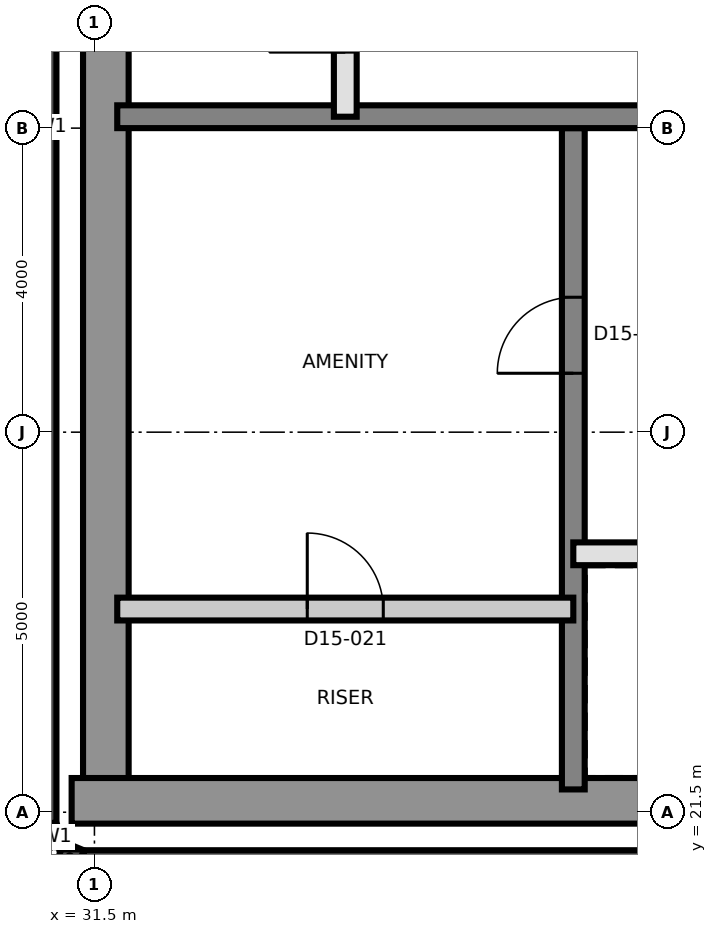
"""IFC4 building model, lengths in metres.
Left out: names, types, materials, properties, quantities, classifications, styles, units other than length and angle.
Written with IfcOpenShell. Run it as: python <this file> out.ifc"""

import sys

from ifc_helpers import new_model, si_unit, direction, frame, frame_2d, origin, place, context, subcontext, project, spatial, rectangle, extrude, element, fill, save


model = new_model("IFC4")
c1 = context("Model", 3, precision=1e-05, world=origin(), true_north=direction((0.0, 1.0)))
c2 = subcontext(c1, "Body", "Model", "MODEL_VIEW")
j1 = project(units=[si_unit("LENGTHUNIT", "METRE"), si_unit("PLANEANGLEUNIT", "RADIAN")], contexts=[c1])
p1 = place(None, origin())
s1 = spatial("IfcSite", under=j1, at=p1, CompositionType="ELEMENT")
p2 = place(p1, origin())
s2 = spatial("IfcBuilding", under=s1, at=p2, CompositionType="ELEMENT")
p3 = place(p2, frame((0.0, 0.0, 153.3)))
s3 = spatial("IfcBuildingStorey", under=s2, at=p3, CompositionType="ELEMENT", Elevation=153.3)
p4 = place(p3, frame((31.65, 21.8, 0.0), z_axis=(0.0, 0.0, 1.0), x_axis=(0.0, 1.0, 0.0)))
e1 = element("IfcWall", 1, at=p4, inside=s3, PredefinedType="SHEAR", context=c2, shape_type="SweptSolid", body=[
    extrude(rectangle(XDim=17.4, YDim=0.6, at=frame_2d((8.7, 0.0))), origin(), (0.0, 0.0, 1.0), 3.7),
])
p5 = place(p3, frame((31.2, 21.65, 0.0), z_axis=(0.0, 0.0, 1.0), x_axis=(1.0, 0.0, 0.0)))
e2 = element("IfcWall", 2, at=p5, inside=s3, PredefinedType="SHEAR", context=c2, shape_type="SweptSolid", body=[
    extrude(rectangle(XDim=27.0, YDim=0.6, at=frame_2d((13.5, 0.0))), origin(), (0.0, 0.0, 1.0), 3.7),
])
p6 = place(p3, frame((37.8, 21.8, 0.0), z_axis=(0.0, 0.0, 1.0), x_axis=(0.0, 1.0, 0.0)))
e3 = element("IfcWall", 3, at=p6, inside=s3, PredefinedType="SHEAR", context=c2, shape_type="SweptSolid", body=[
    extrude(rectangle(XDim=8.7, YDim=0.3, at=frame_2d((4.35, 0.0))), origin(), (0.0, 0.0, 1.0), 3.7),
])
p7 = place(p6, frame((5.475, 0.0, 0.0)))
e4 = element("IfcOpeningElement", 4, at=p7, cuts=e3, PredefinedType="OPENING", context=c2, shape_type="SweptSolid", body=[
    extrude(rectangle(XDim=1.0, YDim=2.1, at=frame_2d((0.5, 1.05))), frame((0.0, 0.16, 0.0), z_axis=(0.0, -1.0, 0.0), x_axis=(1.0, 0.0, 0.0)), (0.0, 0.0, 1.0), 0.32),
])
p8 = place(p3, frame((31.8, 30.65, 0.0), z_axis=(0.0, 0.0, 1.0), x_axis=(1.0, 0.0, 0.0)))
e5 = element("IfcWall", 5, at=p8, inside=s3, PredefinedType="SHEAR", context=c2, shape_type="SweptSolid", body=[
    extrude(rectangle(XDim=26.4, YDim=0.3, at=frame_2d((13.2, 0.0))), origin(), (0.0, 0.0, 1.0), 3.7),
])
p9 = place(p8, frame((24.7, 0.0, 0.0)))
e6 = element("IfcOpeningElement", 6, at=p9, cuts=e5, PredefinedType="OPENING", context=c2, shape_type="SweptSolid", body=[
    extrude(rectangle(XDim=1.0, YDim=2.1, at=frame_2d((0.5, 1.05))), frame((0.0, 0.16, 0.0), z_axis=(0.0, -1.0, 0.0), x_axis=(1.0, 0.0, 0.0)), (0.0, 0.0, 1.0), 0.32),
])
p10 = place(p3, frame((30.85, 39.674, 0.0), z_axis=(0.0, 0.0, 1.0), x_axis=(0.0, -1.0, 0.0)))
e7 = element("IfcWall", 7, at=p10, inside=s3, PredefinedType="SOLIDWALL", context=c2, shape_type="SweptSolid", body=[
    extrude(rectangle(XDim=18.314, YDim=0.3, at=frame_2d((9.157, 0.0))), origin(), (0.0, 0.0, 1.0), 3.4),
])
for number, where, z_axis, x_axis in (
    (8, (30.861, 21.302, 0.0), (0.0, 0.0, 1.0), (0.383, -0.924, 0.0)),
    (9, (31.048, 20.967, 0.0), (0.0, 0.0, 1.0), (0.924, -0.383, 0.0)),
):
    element("IfcWall", number, at=place(p3, frame(where, z_axis=z_axis, x_axis=x_axis)), inside=s3, PredefinedType="SOLIDWALL", context=c2, shape_type="SweptSolid", body=[
        extrude(rectangle(XDim=0.275, YDim=0.3, at=frame_2d((0.138, 0.0))), origin(), (0.0, 0.0, 1.0), 3.4),
    ])
p11 = place(p3, frame((31.36, 20.85, 0.0), z_axis=(0.0, 0.0, 1.0), x_axis=(1.0, 0.0, 0.0)))
e10 = element("IfcWall", 10, at=p11, inside=s3, PredefinedType="SOLIDWALL", context=c2, shape_type="SweptSolid", body=[
    extrude(rectangle(XDim=27.281, YDim=0.3, at=frame_2d((13.64, 0.0))), origin(), (0.0, 0.0, 1.0), 3.4),
])
p12 = place(p3, frame((31.8, 24.173, 0.0), z_axis=(0.0, 0.0, 1.0), x_axis=(1.0, 0.0, 0.0)))
e11 = element("IfcWall", 11, at=p12, inside=s3, PredefinedType="PARTITIONING", context=c2, shape_type="SweptSolid", body=[
    extrude(rectangle(XDim=6.0, YDim=0.3, at=frame_2d((3.0, 0.0))), origin(), (0.0, 0.0, 1.0), 3.4),
])
p13 = place(p12, frame((2.5, 0.0, 0.0)))
e12 = element("IfcOpeningElement", 12, at=p13, cuts=e11, PredefinedType="OPENING", context=c2, shape_type="SweptSolid", body=[
    extrude(rectangle(XDim=1.0, YDim=2.1, at=frame_2d((0.5, 1.05))), frame((0.0, 0.16, 0.0), z_axis=(0.0, -1.0, 0.0), x_axis=(1.0, 0.0, 0.0)), (0.0, 0.0, 1.0), 0.32),
])
p14 = place(p3, frame((37.8, 24.9, 0.0), z_axis=(0.0, 0.0, 1.0), x_axis=(1.0, 0.0, 0.0)))
e13 = element("IfcWall", 13, at=p14, inside=s3, PredefinedType="SOLIDWALL", context=c2, shape_type="SweptSolid", body=[
    extrude(rectangle(XDim=12.0, YDim=0.3, at=frame_2d((6.0, 0.0))), origin(), (0.0, 0.0, 1.0), 3.4),
])
p15 = place(p14, frame((1.05, 0.0, 0.0)))
e14 = element("IfcOpeningElement", 14, at=p15, cuts=e13, PredefinedType="OPENING", context=c2, shape_type="SweptSolid", body=[
    extrude(rectangle(XDim=0.9, YDim=2.1, at=frame_2d((0.45, 1.05))), frame((0.0, 0.16, 0.0), z_axis=(0.0, -1.0, 0.0), x_axis=(1.0, 0.0, 0.0)), (0.0, 0.0, 1.0), 0.32),
])
p16 = place(p14, frame((10.05, 0.0, 0.0)))
e15 = element("IfcOpeningElement", 15, at=p16, cuts=e13, PredefinedType="OPENING", context=c2, shape_type="SweptSolid", body=[
    extrude(rectangle(XDim=0.9, YDim=2.1, at=frame_2d((0.45, 1.05))), frame((0.0, 0.16, 0.0), z_axis=(0.0, -1.0, 0.0), x_axis=(1.0, 0.0, 0.0)), (0.0, 0.0, 1.0), 0.32),
])
p17 = place(p14, frame((3.95, 0.0, 0.0)))
e16 = element("IfcOpeningElement", 16, at=p17, cuts=e13, PredefinedType="OPENING", context=c2, shape_type="SweptSolid", body=[
    extrude(rectangle(XDim=1.1, YDim=2.4, at=frame_2d((0.55, 1.2))), frame((0.0, 0.16, 0.0), z_axis=(0.0, -1.0, 0.0), x_axis=(1.0, 0.0, 0.0)), (0.0, 0.0, 1.0), 0.32),
])
p18 = place(p14, frame((6.95, 0.0, 0.0)))
e17 = element("IfcOpeningElement", 17, at=p18, cuts=e13, PredefinedType="OPENING", context=c2, shape_type="SweptSolid", body=[
    extrude(rectangle(XDim=1.1, YDim=2.4, at=frame_2d((0.55, 1.2))), frame((0.0, 0.16, 0.0), z_axis=(0.0, -1.0, 0.0), x_axis=(1.0, 0.0, 0.0)), (0.0, 0.0, 1.0), 0.32),
])
p19 = place(p3, frame((34.8, 30.65, 0.0), z_axis=(0.0, 0.0, 1.0), x_axis=(0.0, 1.0, 0.0)))
e18 = element("IfcWall", 18, at=p19, inside=s3, PredefinedType="SOLIDWALL", context=c2, shape_type="SweptSolid", body=[
    extrude(rectangle(XDim=2.7, YDim=0.3, at=frame_2d((1.35, 0.0))), origin(), (0.0, 0.0, 1.0), 3.4),
])
p20 = place(p19, frame((0.85, 0.0, 0.0)))
e19 = element("IfcOpeningElement", 19, at=p20, cuts=e18, PredefinedType="OPENING", context=c2, shape_type="SweptSolid", body=[
    extrude(rectangle(XDim=1.0, YDim=2.1, at=frame_2d((0.5, 1.05))), frame((0.0, 0.16, 0.0), z_axis=(0.0, -1.0, 0.0), x_axis=(1.0, 0.0, 0.0)), (0.0, 0.0, 1.0), 0.32),
])
p21 = place(p7, origin())
e20 = element("IfcDoor", 20, at=p21, inside=s3, OperationType="SINGLE_SWING_LEFT", PredefinedType="DOOR", context=c2, shape_type="SweptSolid", body=[
    extrude(rectangle(XDim=1.0, YDim=2.1, at=frame_2d((0.5, 1.05))), frame((0.0, 0.025, 0.0), z_axis=(0.0, -1.0, 0.0), x_axis=(1.0, 0.0, 0.0)), (0.0, 0.0, 1.0), 0.05),
])
fill(e4, e20)
p22 = place(p13, origin())
e21 = element("IfcDoor", 21, at=p22, inside=s3, OperationType="SINGLE_SWING_RIGHT", PredefinedType="DOOR", context=c2, shape_type="SweptSolid", body=[
    extrude(rectangle(XDim=1.0, YDim=2.1, at=frame_2d((0.5, 1.05))), frame((0.0, 0.025, 0.0), z_axis=(0.0, -1.0, 0.0), x_axis=(1.0, 0.0, 0.0)), (0.0, 0.0, 1.0), 0.05),
])
fill(e12, e21)
save(model, sys.argv[1])
